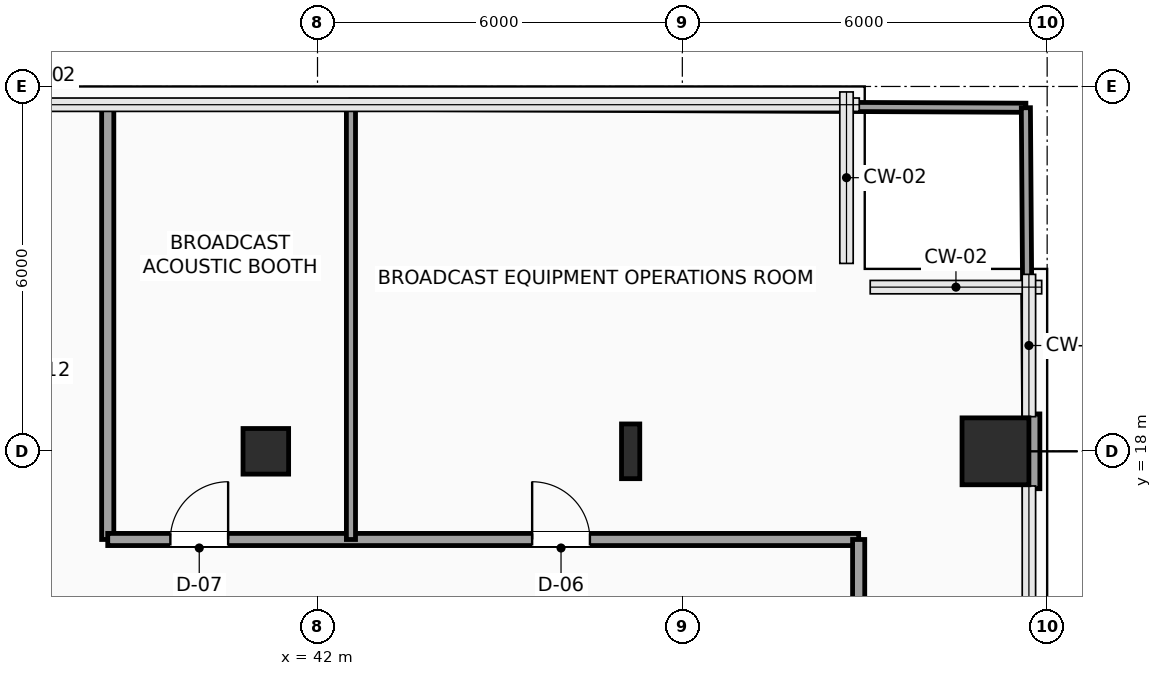
"""IFC4 building model, lengths in metres.
Left out: names, types, materials, properties, quantities, classifications, styles, units other than length and angle.
Written with IfcOpenShell. Run it as: python <this file> out.ifc"""

import sys

from ifc_helpers import new_model, si_unit, direction, frame, frame_2d, origin, origin_2d, place, context, subcontext, project, spatial, rectangle, hollow_rectangle, i_section, extrude, element, fill, save


model = new_model("IFC4")
c1 = context("Model", 3, precision=1e-05, world=origin(), true_north=direction((0.0, 1.0)))
c2 = subcontext(c1, "Body", "Model", "MODEL_VIEW")
j1 = project(units=[si_unit("LENGTHUNIT", "METRE"), si_unit("PLANEANGLEUNIT", "RADIAN")], contexts=[c1])
p1 = place(None, origin())
s1 = spatial("IfcSite", under=j1, at=p1, CompositionType="ELEMENT")
p2 = place(p1, origin())
s2 = spatial("IfcBuilding", under=s1, at=p2, CompositionType="ELEMENT")
p3 = place(p2, frame((0.0, 0.0, 55.8)))
s3 = spatial("IfcBuildingStorey", under=s2, at=p3, CompositionType="ELEMENT", Elevation=55.8)
p4 = place(p3, frame((41.15, 18.0, 0.0), z_axis=(0.0, 0.0, 1.0), x_axis=(1.0, 0.0, 0.0)))
e1 = element("IfcColumn", 1, at=p4, inside=s3, PredefinedType="COLUMN", context=c2, shape_type="SweptSolid", body=[
    extrude(hollow_rectangle(XDim=0.75, YDim=0.75, WallThickness=0.035, InnerFilletRadius=0.035, OuterFilletRadius=0.05, at=origin_2d()), origin(), (0.0, 0.0, 1.0), 3.9),
])
p5 = place(p3, frame((47.15, 18.0, 0.0), z_axis=(0.0, 0.0, 1.0), x_axis=(1.0, 0.0, 0.0)))
e2 = element("IfcColumn", 2, at=p5, inside=s3, PredefinedType="COLUMN", context=c2, shape_type="SweptSolid", body=[
    extrude(i_section(OverallWidth=0.3, OverallDepth=0.9, WebThickness=0.019, FlangeThickness=0.035, FilletRadius=0.03, at=origin_2d()), origin(), (0.0, 0.0, 1.0), 3.9),
])
p6 = place(p3, frame((53.15, 18.0, 0.0), z_axis=(0.0, 0.0, 1.0), x_axis=(1.0, 0.0, 0.0)))
e3 = element("IfcColumn", 3, at=p6, inside=s3, PredefinedType="COLUMN", context=c2, shape_type="SweptSolid", body=[
    extrude(rectangle(XDim=1.1, YDim=1.1, at=origin_2d()), origin(), (0.0, 0.0, 1.0), 3.9),
])
p7 = place(p3, frame((53.76, 18.615, 0.0), z_axis=(0.0, 0.0, 1.0), x_axis=(0.0, -1.0, 0.0)))
e4 = element("IfcWall", 4, at=p7, inside=s3, PredefinedType="SOLIDWALL", context=c2, shape_type="SweptSolid", body=[
    extrude(rectangle(XDim=1.23, YDim=0.24, at=frame_2d((0.615, 0.0))), origin(), (0.0, 0.0, 1.0), 3.65),
])
p8 = place(p3, frame((38.55, 23.7, 0.0), z_axis=(0.0, 0.0, 1.0), x_axis=(0.0, -1.0, 0.0)))
e5 = element("IfcWall", 5, at=p8, inside=s3, PredefinedType="SOLIDWALL", context=c2, shape_type="SweptSolid", body=[
    extrude(rectangle(XDim=7.15, YDim=0.2, at=frame_2d((3.575, 0.0))), origin(), (0.0, 0.0, 1.0), 3.65),
])
p9 = place(p3, frame((38.55, 16.55, 0.0), z_axis=(0.0, 0.0, 1.0), x_axis=(1.0, 0.0, 0.0)))
e6 = element("IfcWall", 6, at=p9, inside=s3, PredefinedType="SOLIDWALL", context=c2, shape_type="SweptSolid", body=[
    extrude(rectangle(XDim=12.35, YDim=0.2, at=frame_2d((6.175, 0.0))), origin(), (0.0, 0.0, 1.0), 3.65),
])
p10 = place(p9, frame((1.03, 0.0, 0.0)))
e7 = element("IfcOpeningElement", 7, at=p10, cuts=e6, PredefinedType="OPENING", context=c2, shape_type="SweptSolid", body=[
    extrude(rectangle(XDim=0.95, YDim=2.15, at=frame_2d((0.475, 1.075))), frame((0.0, 0.11, 0.0), z_axis=(0.0, -1.0, 0.0), x_axis=(1.0, 0.0, 0.0)), (0.0, 0.0, 1.0), 0.22),
])
p11 = place(p9, frame((6.98, 0.0, 0.0)))
e8 = element("IfcOpeningElement", 8, at=p11, cuts=e6, PredefinedType="OPENING", context=c2, shape_type="SweptSolid", body=[
    extrude(rectangle(XDim=0.95, YDim=2.15, at=frame_2d((0.475, 1.075))), frame((0.0, 0.11, 0.0), z_axis=(0.0, -1.0, 0.0), x_axis=(1.0, 0.0, 0.0)), (0.0, 0.0, 1.0), 0.22),
])
p12 = place(p3, frame((50.9, 16.55, 0.0), z_axis=(0.0, 0.0, 1.0), x_axis=(0.0, -1.0, 0.0)))
e9 = element("IfcWall", 9, at=p12, inside=s3, PredefinedType="SOLIDWALL", context=c2, shape_type="SweptSolid", body=[
    extrude(rectangle(XDim=2.35, YDim=0.2, at=frame_2d((1.175, 0.0))), origin(), (0.0, 0.0, 1.0), 3.65),
])
p13 = place(p3, frame((42.55, 16.55, 0.0), z_axis=(0.0, 0.0, 1.0), x_axis=(0.0, 1.0, 0.0)))
e10 = element("IfcWall", 10, at=p13, inside=s3, PredefinedType="PARTITIONING", context=c2, shape_type="SweptSolid", body=[
    extrude(rectangle(XDim=7.15, YDim=0.15, at=frame_2d((3.575, 0.0))), origin(), (0.0, 0.0, 1.0), 3.65),
])
p14 = place(p3, frame((42.55, 23.7, 0.0), z_axis=(0.0, 0.0, 1.0), x_axis=(0.999989834782, -0.004508917104, 0.0)))
e11 = element("IfcWall", 11, at=p14, inside=s3, PredefinedType="PARTITIONING", context=c2, shape_type="SweptSolid", body=[
    extrude(rectangle(XDim=11.1, YDim=0.15, at=frame_2d((5.55, 0.0))), origin(), (0.0, 0.0, 1.0), 3.65),
])
p15 = place(p3, frame((53.7, 16.55, 0.0), z_axis=(0.0, 0.0, 1.0), x_axis=(-0.007017371073, 0.999975377948, 0.0)))
e12 = element("IfcWall", 12, at=p15, inside=s3, PredefinedType="PARTITIONING", context=c2, shape_type="SweptSolid", body=[
    extrude(rectangle(XDim=0.835, YDim=0.15, at=frame_2d((0.417, 0.0))), origin(), (0.0, 0.0, 1.0), 3.65),
])
p16 = place(p3, frame((53.686, 18.615, 0.0), z_axis=(0.0, 0.0, 1.0), x_axis=(-0.007079296972, 0.999974941463, 0.0)))
e13 = element("IfcWall", 13, at=p16, inside=s3, PredefinedType="PARTITIONING", context=c2, shape_type="SweptSolid", body=[
    extrude(rectangle(XDim=5.035, YDim=0.15, at=frame_2d((2.518, 0.0))), origin(), (0.0, 0.0, 1.0), 3.65),
])
p17 = place(p10, origin())
e14 = element("IfcDoor", 14, at=p17, inside=s3, OperationType="SINGLE_SWING_RIGHT", PredefinedType="DOOR", context=c2, shape_type="SweptSolid", body=[
    extrude(rectangle(XDim=0.95, YDim=2.15, at=frame_2d((0.475, 1.075))), frame((0.0, 0.025, 0.0), z_axis=(0.0, -1.0, 0.0), x_axis=(1.0, 0.0, 0.0)), (0.0, 0.0, 1.0), 0.05),
])
fill(e7, e14)
p18 = place(p11, origin())
e15 = element("IfcDoor", 15, at=p18, inside=s3, OperationType="SINGLE_SWING_LEFT", PredefinedType="DOOR", context=c2, shape_type="SweptSolid", body=[
    extrude(rectangle(XDim=0.95, YDim=2.15, at=frame_2d((0.475, 1.075))), frame((0.0, 0.025, 0.0), z_axis=(0.0, -1.0, 0.0), x_axis=(1.0, 0.0, 0.0)), (0.0, 0.0, 1.0), 0.05),
])
fill(e8, e15)
save(model, sys.argv[1])
